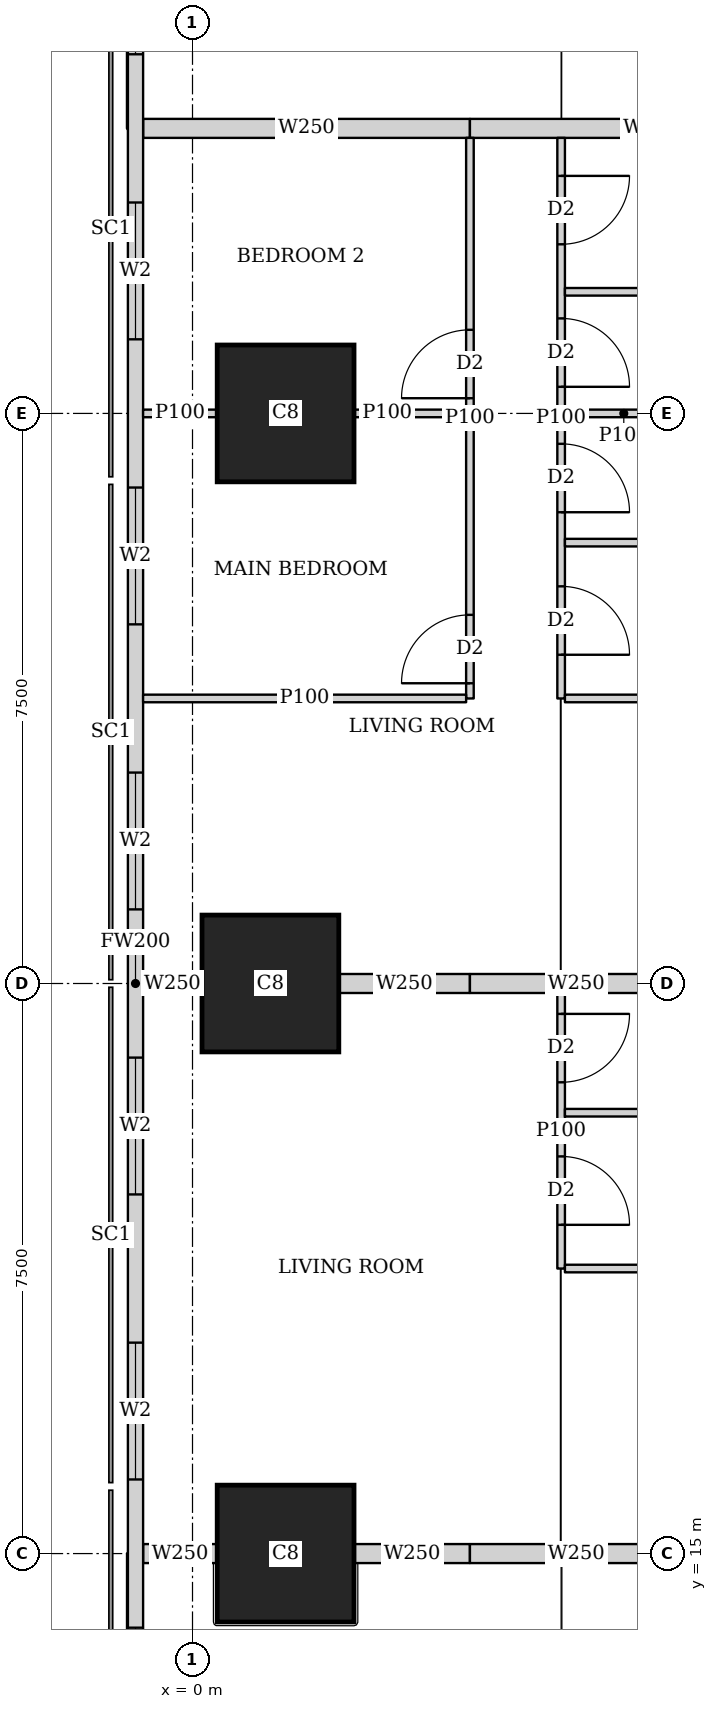
"""IFC4 building model, lengths in metres.
Left out: names, types, materials, properties, quantities, classifications, styles, units other than length and angle.
Written with IfcOpenShell. Run it as: python <this file> out.ifc"""

import sys

from ifc_helpers import new_model, si_unit, direction, frame, frame_2d, origin, origin_2d, place, context, subcontext, project, spatial, rectangle, extrude, element, fill, save


model = new_model("IFC4")
c1 = context("Model", 3, precision=1e-05, world=origin(), true_north=direction((0.0, 1.0)))
c2 = subcontext(c1, "Body", "Model", "MODEL_VIEW")
j1 = project(units=[si_unit("LENGTHUNIT", "METRE"), si_unit("PLANEANGLEUNIT", "RADIAN")], contexts=[c1])
p1 = place(None, origin())
s1 = spatial("IfcSite", under=j1, at=p1, CompositionType="ELEMENT")
p2 = place(p1, origin())
s2 = spatial("IfcBuilding", under=s1, at=p2, CompositionType="ELEMENT")
p3 = place(p2, frame((0.0, 0.0, 180.8)))
s3 = spatial("IfcBuildingStorey", under=s2, at=p3, CompositionType="ELEMENT", Elevation=180.8)
for number, where, z_axis, x_axis in (
    (1, (1.225, 15.0, 0.0), (0.0, 0.0, 1.0), (1.0, 0.0, 0.0)),
    (2, (1.025, 22.5, 0.0), (0.0, 0.0, 1.0), (1.0, 0.0, 0.0)),
    (3, (1.225, 30.0, 0.0), (0.0, 0.0, 1.0), (1.0, 0.0, 0.0)),
):
    element("IfcColumn", number, at=place(p3, frame(where, z_axis=z_axis, x_axis=x_axis)), inside=s3, PredefinedType="COLUMN", context=c2, shape_type="SweptSolid", body=[
        extrude(rectangle(XDim=1.8, YDim=1.8, at=origin_2d()), origin(), (0.0, 0.0, 1.0), 3.75),
    ])
p4 = place(p3, frame((-0.75, 42.837, 0.0), z_axis=(0.0, 0.0, 1.0), x_axis=(0.0, -1.0, 0.0)))
e4 = element("IfcWall", 4, at=p4, inside=s3, PredefinedType="SOLIDWALL", context=c2, shape_type="SweptSolid", body=[
    extrude(rectangle(XDim=40.674, YDim=0.2, at=frame_2d((20.337, 0.0))), origin(), (0.0, 0.0, 1.0), 3.5),
])
p5 = place(p4, frame((1.78, 0.0, 0.9)))
e5 = element("IfcOpeningElement", 5, at=p5, cuts=e4, PredefinedType="OPENING", context=c2, shape_type="SweptSolid", body=[
    extrude(rectangle(XDim=1.8, YDim=1.5, at=frame_2d((0.9, 0.75))), frame((0.0, 0.11, 0.0), z_axis=(0.0, -1.0, 0.0), x_axis=(1.0, 0.0, 0.0)), (0.0, 0.0, 1.0), 0.22),
])
p6 = place(p4, frame((6.312, 0.0, 0.9)))
e6 = element("IfcOpeningElement", 6, at=p6, cuts=e4, PredefinedType="OPENING", context=c2, shape_type="SweptSolid", body=[
    extrude(rectangle(XDim=1.8, YDim=1.5, at=frame_2d((0.9, 0.75))), frame((0.0, 0.11, 0.0), z_axis=(0.0, -1.0, 0.0), x_axis=(1.0, 0.0, 0.0)), (0.0, 0.0, 1.0), 0.22),
])
p7 = place(p4, frame((10.062, 0.0, 0.9)))
e7 = element("IfcOpeningElement", 7, at=p7, cuts=e4, PredefinedType="OPENING", context=c2, shape_type="SweptSolid", body=[
    extrude(rectangle(XDim=1.8, YDim=1.5, at=frame_2d((0.9, 0.75))), frame((0.0, 0.11, 0.0), z_axis=(0.0, -1.0, 0.0), x_axis=(1.0, 0.0, 0.0)), (0.0, 0.0, 1.0), 0.22),
])
p8 = place(p4, frame((13.812, 0.0, 0.9)))
e8 = element("IfcOpeningElement", 8, at=p8, cuts=e4, PredefinedType="OPENING", context=c2, shape_type="SweptSolid", body=[
    extrude(rectangle(XDim=1.8, YDim=1.5, at=frame_2d((0.9, 0.75))), frame((0.0, 0.11, 0.0), z_axis=(0.0, -1.0, 0.0), x_axis=(1.0, 0.0, 0.0)), (0.0, 0.0, 1.0), 0.22),
])
p9 = place(p4, frame((17.562, 0.0, 0.9)))
e9 = element("IfcOpeningElement", 9, at=p9, cuts=e4, PredefinedType="OPENING", context=c2, shape_type="SweptSolid", body=[
    extrude(rectangle(XDim=1.8, YDim=1.5, at=frame_2d((0.9, 0.75))), frame((0.0, 0.11, 0.0), z_axis=(0.0, -1.0, 0.0), x_axis=(1.0, 0.0, 0.0)), (0.0, 0.0, 1.0), 0.22),
])
p10 = place(p4, frame((21.312, 0.0, 0.9)))
e10 = element("IfcOpeningElement", 10, at=p10, cuts=e4, PredefinedType="OPENING", context=c2, shape_type="SweptSolid", body=[
    extrude(rectangle(XDim=1.8, YDim=1.5, at=frame_2d((0.9, 0.75))), frame((0.0, 0.11, 0.0), z_axis=(0.0, -1.0, 0.0), x_axis=(1.0, 0.0, 0.0)), (0.0, 0.0, 1.0), 0.22),
])
p11 = place(p4, frame((25.062, 0.0, 0.9)))
e11 = element("IfcOpeningElement", 11, at=p11, cuts=e4, PredefinedType="OPENING", context=c2, shape_type="SweptSolid", body=[
    extrude(rectangle(XDim=1.8, YDim=1.5, at=frame_2d((0.9, 0.75))), frame((0.0, 0.11, 0.0), z_axis=(0.0, -1.0, 0.0), x_axis=(1.0, 0.0, 0.0)), (0.0, 0.0, 1.0), 0.22),
])
p12 = place(p4, frame((28.812, 0.0, 0.9)))
e12 = element("IfcOpeningElement", 12, at=p12, cuts=e4, PredefinedType="OPENING", context=c2, shape_type="SweptSolid", body=[
    extrude(rectangle(XDim=1.8, YDim=1.5, at=frame_2d((0.9, 0.75))), frame((0.0, 0.11, 0.0), z_axis=(0.0, -1.0, 0.0), x_axis=(1.0, 0.0, 0.0)), (0.0, 0.0, 1.0), 0.22),
])
p13 = place(p4, frame((32.562, 0.0, 0.9)))
e13 = element("IfcOpeningElement", 13, at=p13, cuts=e4, PredefinedType="OPENING", context=c2, shape_type="SweptSolid", body=[
    extrude(rectangle(XDim=1.8, YDim=1.5, at=frame_2d((0.9, 0.75))), frame((0.0, 0.11, 0.0), z_axis=(0.0, -1.0, 0.0), x_axis=(1.0, 0.0, 0.0)), (0.0, 0.0, 1.0), 0.22),
])
p14 = place(p4, frame((37.094, 0.0, 0.9)))
e14 = element("IfcOpeningElement", 14, at=p14, cuts=e4, PredefinedType="OPENING", context=c2, shape_type="SweptSolid", body=[
    extrude(rectangle(XDim=1.8, YDim=1.5, at=frame_2d((0.9, 0.75))), frame((0.0, 0.11, 0.0), z_axis=(0.0, -1.0, 0.0), x_axis=(1.0, 0.0, 0.0)), (0.0, 0.0, 1.0), 0.22),
])
p15 = place(p3, frame((4.85, 18.75, 0.0), z_axis=(0.0, 0.0, 1.0), x_axis=(0.0, 1.0, 0.0)))
e15 = element("IfcWall", 15, at=p15, inside=s3, PredefinedType="PARTITIONING", context=c2, shape_type="SweptSolid", body=[
    extrude(rectangle(XDim=3.625, YDim=0.1, at=frame_2d((1.812, 0.0))), origin(), (0.0, 0.0, 1.0), 3.5),
])
p16 = place(p15, frame((0.575, 0.0, 0.0)))
e16 = element("IfcOpeningElement", 16, at=p16, cuts=e15, PredefinedType="OPENING", context=c2, shape_type="SweptSolid", body=[
    extrude(rectangle(XDim=0.9, YDim=2.1, at=frame_2d((0.45, 1.05))), frame((0.0, 0.06, 0.0), z_axis=(0.0, -1.0, 0.0), x_axis=(1.0, 0.0, 0.0)), (0.0, 0.0, 1.0), 0.12),
])
p17 = place(p15, frame((2.45, 0.0, 0.0)))
e17 = element("IfcOpeningElement", 17, at=p17, cuts=e15, PredefinedType="OPENING", context=c2, shape_type="SweptSolid", body=[
    extrude(rectangle(XDim=0.9, YDim=2.1, at=frame_2d((0.45, 1.05))), frame((0.0, 0.06, 0.0), z_axis=(0.0, -1.0, 0.0), x_axis=(1.0, 0.0, 0.0)), (0.0, 0.0, 1.0), 0.12),
])
for number, where, z_axis, x_axis in (
    (18, (4.9, 18.75, 0.0), (0.0, 0.0, 1.0), (1.0, 0.0, 0.0)),
    (19, (4.9, 20.8, 0.0), (0.0, 0.0, 1.0), (1.0, 0.0, 0.0)),
):
    element("IfcWall", number, at=place(p3, frame(where, z_axis=z_axis, x_axis=x_axis)), inside=s3, PredefinedType="PARTITIONING", context=c2, shape_type="SweptSolid", body=[
        extrude(rectangle(XDim=3.525, YDim=0.1, at=frame_2d((1.763, 0.0))), origin(), (0.0, 0.0, 1.0), 3.5),
    ])
p18 = place(p3, frame((-0.65, 15.0, 0.0), z_axis=(0.0, 0.0, 1.0), x_axis=(1.0, 0.0, 0.0)))
e20 = element("IfcWall", 20, at=p18, inside=s3, PredefinedType="SOLIDWALL", context=c2, shape_type="SweptSolid", body=[
    extrude(rectangle(XDim=0.974, YDim=0.25, at=frame_2d((0.487, 0.0))), origin(), (0.0, 0.0, 1.0), 2.1),
])
p19 = place(p3, frame((2.126, 15.0, 0.0), z_axis=(0.0, 0.0, 1.0), x_axis=(1.0, 0.0, 0.0)))
e21 = element("IfcWall", 21, at=p19, inside=s3, PredefinedType="SOLIDWALL", context=c2, shape_type="SweptSolid", body=[
    extrude(rectangle(XDim=1.524, YDim=0.25, at=frame_2d((0.762, 0.0))), origin(), (0.0, 0.0, 1.0), 2.1),
])
p20 = place(p3, frame((3.65, 15.0, 0.0), z_axis=(0.0, 0.0, 1.0), x_axis=(1.0, 0.0, 0.0)))
e22 = element("IfcWall", 22, at=p20, inside=s3, PredefinedType="SOLIDWALL", context=c2, shape_type="SweptSolid", body=[
    extrude(rectangle(XDim=2.799, YDim=0.25, at=frame_2d((1.399, 0.0))), origin(), (0.0, 0.0, 1.0), 3.5),
])
p21 = place(p3, frame((3.65, 26.25, 0.0), z_axis=(0.0, 0.0, 1.0), x_axis=(0.0, 1.0, 0.0)))
e23 = element("IfcWall", 23, at=p21, inside=s3, PredefinedType="PARTITIONING", context=c2, shape_type="SweptSolid", body=[
    extrude(rectangle(XDim=7.375, YDim=0.1, at=frame_2d((3.688, 0.0))), origin(), (0.0, 0.0, 1.0), 3.5),
])
p22 = place(p21, frame((0.2, 0.0, 0.0)))
e24 = element("IfcOpeningElement", 24, at=p22, cuts=e23, PredefinedType="OPENING", context=c2, shape_type="SweptSolid", body=[
    extrude(rectangle(XDim=0.9, YDim=2.1, at=frame_2d((0.45, 1.05))), frame((0.0, 0.06, 0.0), z_axis=(0.0, -1.0, 0.0), x_axis=(1.0, 0.0, 0.0)), (0.0, 0.0, 1.0), 0.12),
])
p23 = place(p21, frame((3.95, 0.0, 0.0)))
e25 = element("IfcOpeningElement", 25, at=p23, cuts=e23, PredefinedType="OPENING", context=c2, shape_type="SweptSolid", body=[
    extrude(rectangle(XDim=0.9, YDim=2.1, at=frame_2d((0.45, 1.05))), frame((0.0, 0.06, 0.0), z_axis=(0.0, -1.0, 0.0), x_axis=(1.0, 0.0, 0.0)), (0.0, 0.0, 1.0), 0.12),
])
p24 = place(p3, frame((4.85, 26.25, 0.0), z_axis=(0.0, 0.0, 1.0), x_axis=(0.0, 1.0, 0.0)))
e26 = element("IfcWall", 26, at=p24, inside=s3, PredefinedType="PARTITIONING", context=c2, shape_type="SweptSolid", body=[
    extrude(rectangle(XDim=7.375, YDim=0.1, at=frame_2d((3.688, 0.0))), origin(), (0.0, 0.0, 1.0), 3.5),
])
p25 = place(p24, frame((0.575, 0.0, 0.0)))
e27 = element("IfcOpeningElement", 27, at=p25, cuts=e26, PredefinedType="OPENING", context=c2, shape_type="SweptSolid", body=[
    extrude(rectangle(XDim=0.9, YDim=2.1, at=frame_2d((0.45, 1.05))), frame((0.0, 0.06, 0.0), z_axis=(0.0, -1.0, 0.0), x_axis=(1.0, 0.0, 0.0)), (0.0, 0.0, 1.0), 0.12),
])
p26 = place(p24, frame((4.1, 0.0, 0.0)))
e28 = element("IfcOpeningElement", 28, at=p26, cuts=e26, PredefinedType="OPENING", context=c2, shape_type="SweptSolid", body=[
    extrude(rectangle(XDim=0.9, YDim=2.1, at=frame_2d((0.45, 1.05))), frame((0.0, 0.06, 0.0), z_axis=(0.0, -1.0, 0.0), x_axis=(1.0, 0.0, 0.0)), (0.0, 0.0, 1.0), 0.12),
])
p27 = place(p24, frame((2.45, 0.0, 0.0)))
e29 = element("IfcOpeningElement", 29, at=p27, cuts=e26, PredefinedType="OPENING", context=c2, shape_type="SweptSolid", body=[
    extrude(rectangle(XDim=0.9, YDim=2.1, at=frame_2d((0.45, 1.05))), frame((0.0, 0.06, 0.0), z_axis=(0.0, -1.0, 0.0), x_axis=(1.0, 0.0, 0.0)), (0.0, 0.0, 1.0), 0.12),
])
p28 = place(p24, frame((5.975, 0.0, 0.0)))
e30 = element("IfcOpeningElement", 30, at=p28, cuts=e26, PredefinedType="OPENING", context=c2, shape_type="SweptSolid", body=[
    extrude(rectangle(XDim=0.9, YDim=2.1, at=frame_2d((0.45, 1.05))), frame((0.0, 0.06, 0.0), z_axis=(0.0, -1.0, 0.0), x_axis=(1.0, 0.0, 0.0)), (0.0, 0.0, 1.0), 0.12),
])
p29 = place(p3, frame((-0.65, 26.25, 0.0), z_axis=(0.0, 0.0, 1.0), x_axis=(1.0, 0.0, 0.0)))
e31 = element("IfcWall", 31, at=p29, inside=s3, PredefinedType="PARTITIONING", context=c2, shape_type="SweptSolid", body=[
    extrude(rectangle(XDim=4.25, YDim=0.1, at=frame_2d((2.125, 0.0))), origin(), (0.0, 0.0, 1.0), 2.1),
])
p30 = place(p3, frame((-0.65, 30.0, 0.0), z_axis=(0.0, 0.0, 1.0), x_axis=(1.0, 0.0, 0.0)))
e32 = element("IfcWall", 32, at=p30, inside=s3, PredefinedType="PARTITIONING", context=c2, shape_type="SweptSolid", body=[
    extrude(rectangle(XDim=0.974, YDim=0.1, at=frame_2d((0.487, 0.0))), origin(), (0.0, 0.0, 1.0), 3.5),
])
p31 = place(p3, frame((2.126, 30.0, 0.0), z_axis=(0.0, 0.0, 1.0), x_axis=(1.0, 0.0, 0.0)))
e33 = element("IfcWall", 33, at=p31, inside=s3, PredefinedType="PARTITIONING", context=c2, shape_type="SweptSolid", body=[
    extrude(rectangle(XDim=1.474, YDim=0.1, at=frame_2d((0.737, 0.0))), origin(), (0.0, 0.0, 1.0), 3.5),
])
p32 = place(p3, frame((4.9, 26.25, 0.0), z_axis=(0.0, 0.0, 1.0), x_axis=(1.0, 0.0, 0.0)))
e34 = element("IfcWall", 34, at=p32, inside=s3, PredefinedType="PARTITIONING", context=c2, shape_type="SweptSolid", body=[
    extrude(rectangle(XDim=3.525, YDim=0.1, at=frame_2d((1.763, 0.0))), origin(), (0.0, 0.0, 1.0), 3.5),
])
p33 = place(p3, frame((4.9, 30.0, 0.0), z_axis=(0.0, 0.0, 1.0), x_axis=(1.0, 0.0, 0.0)))
e35 = element("IfcWall", 35, at=p33, inside=s3, PredefinedType="PARTITIONING", context=c2, shape_type="SweptSolid", body=[
    extrude(rectangle(XDim=1.549, YDim=0.1, at=frame_2d((0.774, 0.0))), origin(), (0.0, 0.0, 1.0), 3.5),
])
for number, where, z_axis, x_axis in (
    (36, (4.9, 28.3, 0.0), (0.0, 0.0, 1.0), (1.0, 0.0, 0.0)),
    (37, (4.9, 31.6, 0.0), (0.0, 0.0, 1.0), (1.0, 0.0, 0.0)),
):
    element("IfcWall", number, at=place(p3, frame(where, z_axis=z_axis, x_axis=x_axis)), inside=s3, PredefinedType="PARTITIONING", context=c2, shape_type="SweptSolid", body=[
        extrude(rectangle(XDim=3.525, YDim=0.1, at=frame_2d((1.763, 0.0))), origin(), (0.0, 0.0, 1.0), 3.5),
    ])
p34 = place(p3, frame((-0.65, 22.5, 0.0), z_axis=(0.0, 0.0, 1.0), x_axis=(1.0, 0.0, 0.0)))
e38 = element("IfcWall", 38, at=p34, inside=s3, PredefinedType="SOLIDWALL", context=c2, shape_type="SweptSolid", body=[
    extrude(rectangle(XDim=0.774, YDim=0.25, at=frame_2d((0.387, 0.0))), origin(), (0.0, 0.0, 1.0), 2.1),
])
p35 = place(p3, frame((1.926, 22.5, 0.0), z_axis=(0.0, 0.0, 1.0), x_axis=(1.0, 0.0, 0.0)))
e39 = element("IfcWall", 39, at=p35, inside=s3, PredefinedType="SOLIDWALL", context=c2, shape_type="SweptSolid", body=[
    extrude(rectangle(XDim=1.724, YDim=0.25, at=frame_2d((0.862, 0.0))), origin(), (0.0, 0.0, 1.0), 2.1),
])
p36 = place(p3, frame((3.65, 22.5, 0.0), z_axis=(0.0, 0.0, 1.0), x_axis=(1.0, 0.0, 0.0)))
e40 = element("IfcWall", 40, at=p36, inside=s3, PredefinedType="SOLIDWALL", context=c2, shape_type="SweptSolid", body=[
    extrude(rectangle(XDim=2.799, YDim=0.25, at=frame_2d((1.399, 0.0))), origin(), (0.0, 0.0, 1.0), 3.5),
])
p37 = place(p3, frame((-0.65, 33.75, 0.0), z_axis=(0.0, 0.0, 1.0), x_axis=(1.0, 0.0, 0.0)))
e41 = element("IfcWall", 41, at=p37, inside=s3, PredefinedType="SOLIDWALL", context=c2, shape_type="SweptSolid", body=[
    extrude(rectangle(XDim=4.3, YDim=0.25, at=frame_2d((2.15, 0.0))), origin(), (0.0, 0.0, 1.0), 2.1),
])
p38 = place(p3, frame((3.65, 33.75, 0.0), z_axis=(0.0, 0.0, 1.0), x_axis=(1.0, 0.0, 0.0)))
e42 = element("IfcWall", 42, at=p38, inside=s3, PredefinedType="SOLIDWALL", context=c2, shape_type="SweptSolid", body=[
    extrude(rectangle(XDim=4.775, YDim=0.25, at=frame_2d((2.388, 0.0))), origin(), (0.0, 0.0, 1.0), 3.5),
])
p39 = place(p6, origin())
e43 = element("IfcWindow", 43, at=p39, inside=s3, PartitioningType="SINGLE_PANEL", PredefinedType="WINDOW", context=c2, shape_type="SweptSolid", body=[
    extrude(rectangle(XDim=1.8, YDim=1.5, at=frame_2d((0.9, 0.75))), frame((0.0, 0.03, 0.0), z_axis=(0.0, -1.0, 0.0), x_axis=(1.0, 0.0, 0.0)), (0.0, 0.0, 1.0), 0.06),
])
fill(e6, e43)
p40 = place(p7, origin())
e44 = element("IfcWindow", 44, at=p40, inside=s3, PartitioningType="SINGLE_PANEL", PredefinedType="WINDOW", context=c2, shape_type="SweptSolid", body=[
    extrude(rectangle(XDim=1.8, YDim=1.5, at=frame_2d((0.9, 0.75))), frame((0.0, 0.03, 0.0), z_axis=(0.0, -1.0, 0.0), x_axis=(1.0, 0.0, 0.0)), (0.0, 0.0, 1.0), 0.06),
])
fill(e7, e44)
p41 = place(p8, origin())
e45 = element("IfcWindow", 45, at=p41, inside=s3, PartitioningType="SINGLE_PANEL", PredefinedType="WINDOW", context=c2, shape_type="SweptSolid", body=[
    extrude(rectangle(XDim=1.8, YDim=1.5, at=frame_2d((0.9, 0.75))), frame((0.0, 0.03, 0.0), z_axis=(0.0, -1.0, 0.0), x_axis=(1.0, 0.0, 0.0)), (0.0, 0.0, 1.0), 0.06),
])
fill(e8, e45)
p42 = place(p9, origin())
e46 = element("IfcWindow", 46, at=p42, inside=s3, PartitioningType="SINGLE_PANEL", PredefinedType="WINDOW", context=c2, shape_type="SweptSolid", body=[
    extrude(rectangle(XDim=1.8, YDim=1.5, at=frame_2d((0.9, 0.75))), frame((0.0, 0.03, 0.0), z_axis=(0.0, -1.0, 0.0), x_axis=(1.0, 0.0, 0.0)), (0.0, 0.0, 1.0), 0.06),
])
fill(e9, e46)
p43 = place(p10, origin())
e47 = element("IfcWindow", 47, at=p43, inside=s3, PartitioningType="SINGLE_PANEL", PredefinedType="WINDOW", context=c2, shape_type="SweptSolid", body=[
    extrude(rectangle(XDim=1.8, YDim=1.5, at=frame_2d((0.9, 0.75))), frame((0.0, 0.03, 0.0), z_axis=(0.0, -1.0, 0.0), x_axis=(1.0, 0.0, 0.0)), (0.0, 0.0, 1.0), 0.06),
])
fill(e10, e47)
p44 = place(p11, origin())
e48 = element("IfcWindow", 48, at=p44, inside=s3, PartitioningType="SINGLE_PANEL", PredefinedType="WINDOW", context=c2, shape_type="SweptSolid", body=[
    extrude(rectangle(XDim=1.8, YDim=1.5, at=frame_2d((0.9, 0.75))), frame((0.0, 0.03, 0.0), z_axis=(0.0, -1.0, 0.0), x_axis=(1.0, 0.0, 0.0)), (0.0, 0.0, 1.0), 0.06),
])
fill(e11, e48)
p45 = place(p12, origin())
e49 = element("IfcWindow", 49, at=p45, inside=s3, PartitioningType="SINGLE_PANEL", PredefinedType="WINDOW", context=c2, shape_type="SweptSolid", body=[
    extrude(rectangle(XDim=1.8, YDim=1.5, at=frame_2d((0.9, 0.75))), frame((0.0, 0.03, 0.0), z_axis=(0.0, -1.0, 0.0), x_axis=(1.0, 0.0, 0.0)), (0.0, 0.0, 1.0), 0.06),
])
fill(e12, e49)
p46 = place(p16, origin())
e50 = element("IfcDoor", 50, at=p46, inside=s3, OperationType="SINGLE_SWING_RIGHT", PredefinedType="DOOR", context=c2, shape_type="SweptSolid", body=[
    extrude(rectangle(XDim=0.9, YDim=2.1, at=frame_2d((0.45, 1.05))), frame((0.0, 0.025, 0.0), z_axis=(0.0, -1.0, 0.0), x_axis=(1.0, 0.0, 0.0)), (0.0, 0.0, 1.0), 0.05),
])
fill(e16, e50)
p47 = place(p17, origin())
e51 = element("IfcDoor", 51, at=p47, inside=s3, OperationType="SINGLE_SWING_LEFT", PredefinedType="DOOR", context=c2, shape_type="SweptSolid", body=[
    extrude(rectangle(XDim=0.9, YDim=2.1, at=frame_2d((0.45, 1.05))), frame((0.0, 0.025, 0.0), z_axis=(0.0, -1.0, 0.0), x_axis=(1.0, 0.0, 0.0)), (0.0, 0.0, 1.0), 0.05),
])
fill(e17, e51)
p48 = place(p22, origin())
e52 = element("IfcDoor", 52, at=p48, inside=s3, OperationType="SINGLE_SWING_LEFT", PredefinedType="DOOR", context=c2, shape_type="SweptSolid", body=[
    extrude(rectangle(XDim=0.9, YDim=2.1, at=frame_2d((0.45, 1.05))), frame((0.0, 0.025, 0.0), z_axis=(0.0, -1.0, 0.0), x_axis=(1.0, 0.0, 0.0)), (0.0, 0.0, 1.0), 0.05),
])
fill(e24, e52)
p49 = place(p23, origin())
e53 = element("IfcDoor", 53, at=p49, inside=s3, OperationType="SINGLE_SWING_LEFT", PredefinedType="DOOR", context=c2, shape_type="SweptSolid", body=[
    extrude(rectangle(XDim=0.9, YDim=2.1, at=frame_2d((0.45, 1.05))), frame((0.0, 0.025, 0.0), z_axis=(0.0, -1.0, 0.0), x_axis=(1.0, 0.0, 0.0)), (0.0, 0.0, 1.0), 0.05),
])
fill(e25, e53)
p50 = place(p25, origin())
e54 = element("IfcDoor", 54, at=p50, inside=s3, OperationType="SINGLE_SWING_RIGHT", PredefinedType="DOOR", context=c2, shape_type="SweptSolid", body=[
    extrude(rectangle(XDim=0.9, YDim=2.1, at=frame_2d((0.45, 1.05))), frame((0.0, 0.025, 0.0), z_axis=(0.0, -1.0, 0.0), x_axis=(1.0, 0.0, 0.0)), (0.0, 0.0, 1.0), 0.05),
])
fill(e27, e54)
p51 = place(p26, origin())
e55 = element("IfcDoor", 55, at=p51, inside=s3, OperationType="SINGLE_SWING_RIGHT", PredefinedType="DOOR", context=c2, shape_type="SweptSolid", body=[
    extrude(rectangle(XDim=0.9, YDim=2.1, at=frame_2d((0.45, 1.05))), frame((0.0, 0.025, 0.0), z_axis=(0.0, -1.0, 0.0), x_axis=(1.0, 0.0, 0.0)), (0.0, 0.0, 1.0), 0.05),
])
fill(e28, e55)
p52 = place(p27, origin())
e56 = element("IfcDoor", 56, at=p52, inside=s3, OperationType="SINGLE_SWING_RIGHT", PredefinedType="DOOR", context=c2, shape_type="SweptSolid", body=[
    extrude(rectangle(XDim=0.9, YDim=2.1, at=frame_2d((0.45, 1.05))), frame((0.0, 0.025, 0.0), z_axis=(0.0, -1.0, 0.0), x_axis=(1.0, 0.0, 0.0)), (0.0, 0.0, 1.0), 0.05),
])
fill(e29, e56)
p53 = place(p28, origin())
e57 = element("IfcDoor", 57, at=p53, inside=s3, OperationType="SINGLE_SWING_LEFT", PredefinedType="DOOR", context=c2, shape_type="SweptSolid", body=[
    extrude(rectangle(XDim=0.9, YDim=2.1, at=frame_2d((0.45, 1.05))), frame((0.0, 0.025, 0.0), z_axis=(0.0, -1.0, 0.0), x_axis=(1.0, 0.0, 0.0)), (0.0, 0.0, 1.0), 0.05),
])
fill(e30, e57)
save(model, sys.argv[1])
